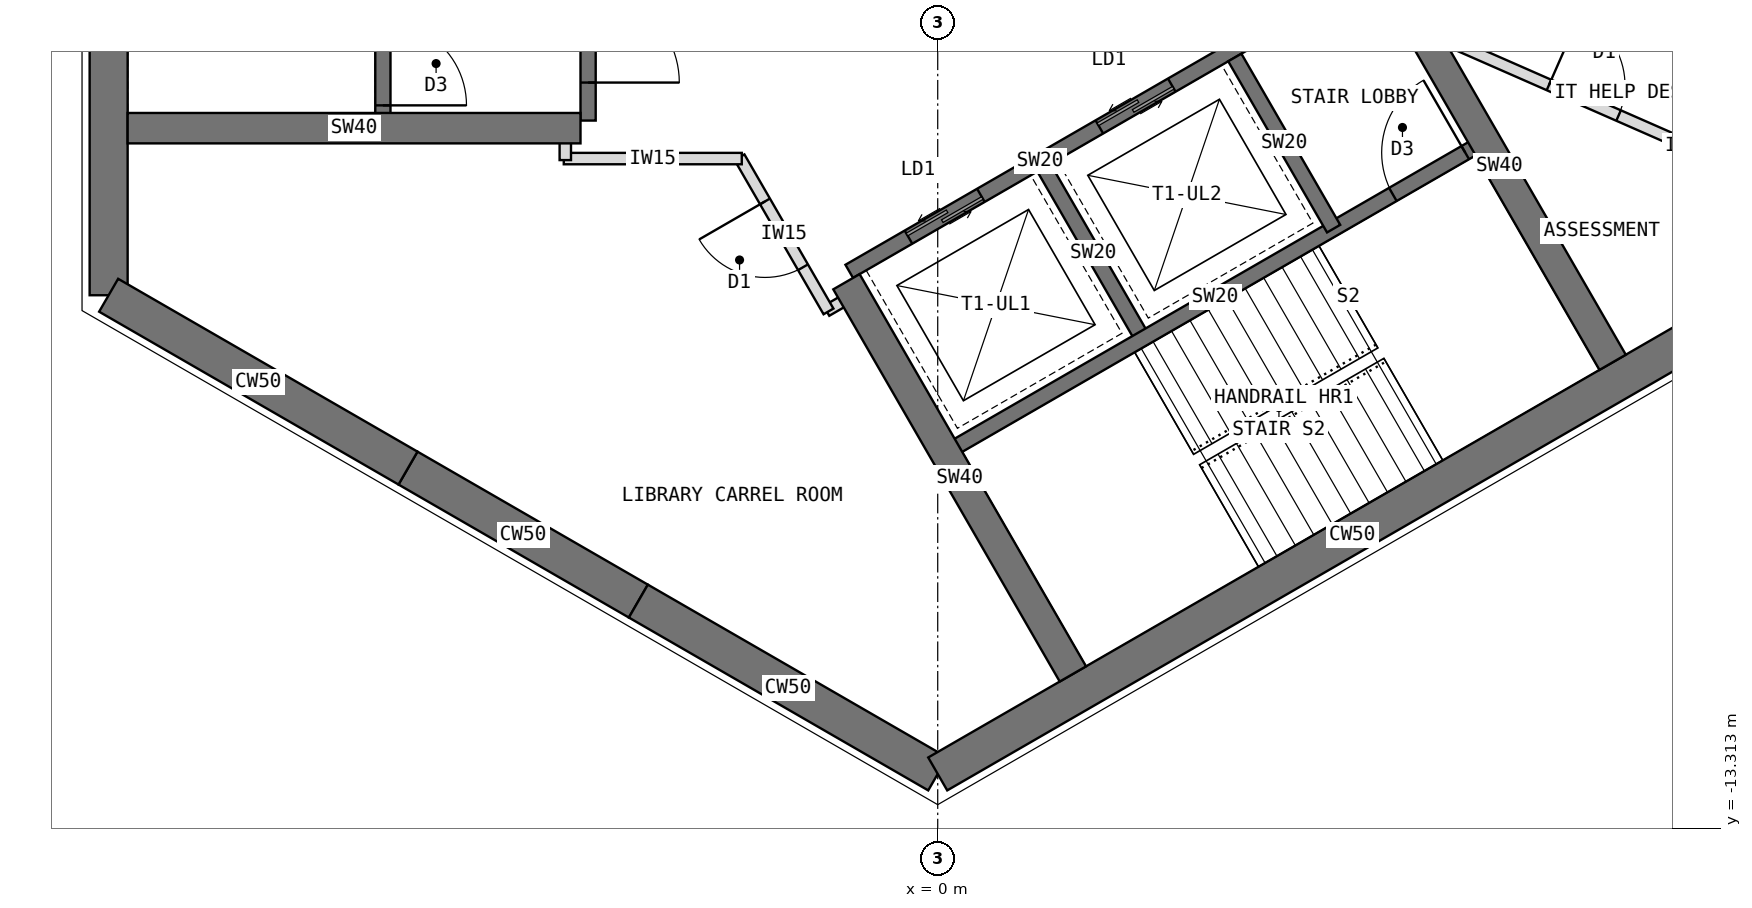
"""IFC4 building model, lengths in metres.
Left out: names, types, materials, properties, quantities, classifications, styles, units other than length and angle.
Written with IfcOpenShell. Run it as: python <this file> out.ifc"""

import sys

from ifc_helpers import new_model, si_unit, direction, frame, frame_2d, origin, place, context, subcontext, project, spatial, rectangle, extrude, element, fill, save


model = new_model("IFC4")
c1 = context("Model", 3, precision=1e-05, world=origin(), true_north=direction((0.0, 1.0)))
c2 = subcontext(c1, "Body", "Model", "MODEL_VIEW")
j1 = project(units=[si_unit("LENGTHUNIT", "METRE"), si_unit("PLANEANGLEUNIT", "RADIAN")], contexts=[c1])
p1 = place(None, origin())
s1 = spatial("IfcSite", under=j1, at=p1, CompositionType="ELEMENT")
p2 = place(p1, origin())
s2 = spatial("IfcBuilding", under=s1, at=p2, CompositionType="ELEMENT")
p3 = place(p2, frame((0.0, 0.0, 194.5)))
s3 = spatial("IfcBuildingStorey", under=s2, at=p3, CompositionType="ELEMENT", Elevation=194.5)
p4 = place(p3, frame((-10.908, 6.298, 0.0), z_axis=(0.0, 0.0, 1.0), x_axis=(0.0, -1.0, 0.0)))
e1 = element("IfcWall", 1, at=p4, inside=s3, PredefinedType="SHEAR", context=c2, shape_type="SweptSolid", body=[
    extrude(rectangle(XDim=12.596, YDim=0.5, at=frame_2d((6.298, 0.0))), origin(), (0.0, 0.0, 1.0), 4.0),
])
p5 = place(p3, frame((-10.908, -6.298, 0.0), z_axis=(0.0, 0.0, 1.0), x_axis=(0.866034513004, -0.499984222037, 0.0)))
e2 = element("IfcWall", 2, at=p5, inside=s3, PredefinedType="SHEAR", context=c2, shape_type="SweptSolid", body=[
    extrude(rectangle(XDim=4.548, YDim=0.5, at=frame_2d((2.274, 0.0))), origin(), (0.0, 0.0, 1.0), 4.0),
])
p6 = place(p3, frame((-6.97, -8.572, 0.0), z_axis=(0.0, 0.0, 1.0), x_axis=(0.866019471182, -0.500010275428, 0.0)))
e3 = element("IfcWall", 3, at=p6, inside=s3, PredefinedType="SHEAR", context=c2, shape_type="SweptSolid", body=[
    extrude(rectangle(XDim=3.5, YDim=0.5, at=frame_2d((1.75, 0.0))), origin(), (0.0, 0.0, 1.0), 4.0),
])
p7 = place(p3, frame((-3.939, -10.322, 0.0), z_axis=(0.0, 0.0, 1.0), x_axis=(0.866011268655, -0.500024481964, 0.0)))
e4 = element("IfcWall", 4, at=p7, inside=s3, PredefinedType="SHEAR", context=c2, shape_type="SweptSolid", body=[
    extrude(rectangle(XDim=4.548, YDim=0.5, at=frame_2d((2.274, 0.0))), origin(), (0.0, 0.0, 1.0), 4.0),
])
p8 = place(p3, frame((0.0, -12.596, 0.0), z_axis=(0.0, 0.0, 1.0), x_axis=(0.866021940709, 0.500005998175, 0.0)))
e5 = element("IfcWall", 5, at=p8, inside=s3, PredefinedType="SHEAR", context=c2, shape_type="SweptSolid", body=[
    extrude(rectangle(XDim=12.596, YDim=0.5, at=frame_2d((6.298, 0.0))), origin(), (0.0, 0.0, 1.0), 4.0),
])
p9 = place(p3, frame((-4.6, 4.0, 0.0), z_axis=(0.0, 0.0, 1.0), x_axis=(0.0, -1.0, 0.0)))
e6 = element("IfcWall", 6, at=p9, inside=s3, PredefinedType="SHEAR", context=c2, shape_type="SweptSolid", body=[
    extrude(rectangle(XDim=8.0, YDim=0.2, at=frame_2d((4.0, 0.0))), origin(), (0.0, 0.0, 1.0), 4.0),
])
p10 = place(p9, frame((6.3, 0.0, 0.0)))
e7 = element("IfcOpeningElement", 7, at=p10, cuts=e6, PredefinedType="OPENING", context=c2, shape_type="SweptSolid", body=[
    extrude(rectangle(XDim=1.2, YDim=2.1, at=frame_2d((0.6, 1.05))), frame((0.0, 0.11, 0.0), z_axis=(0.0, -1.0, 0.0), x_axis=(1.0, 0.0, 0.0)), (0.0, 0.0, 1.0), 0.22),
])
p11 = place(p9, frame((0.9, 0.0, 0.0)))
e8 = element("IfcOpeningElement", 8, at=p11, cuts=e6, PredefinedType="OPENING", context=c2, shape_type="SweptSolid", body=[
    extrude(rectangle(XDim=1.1, YDim=2.2, at=frame_2d((0.55, 1.1))), frame((0.0, 0.11, 0.0), z_axis=(0.0, -1.0, 0.0), x_axis=(1.0, 0.0, 0.0)), (0.0, 0.0, 1.0), 0.22),
])
p12 = place(p3, frame((-7.3, 4.0, 0.0), z_axis=(0.0, 0.0, 1.0), x_axis=(0.0, -1.0, 0.0)))
e9 = element("IfcWall", 9, at=p12, inside=s3, PredefinedType="SHEAR", context=c2, shape_type="SweptSolid", body=[
    extrude(rectangle(XDim=8.0, YDim=0.2, at=frame_2d((4.0, 0.0))), origin(), (0.0, 0.0, 1.0), 4.0),
])
p13 = place(p12, frame((6.7, 0.0, 0.0)))
e10 = element("IfcOpeningElement", 10, at=p13, cuts=e9, PredefinedType="OPENING", context=c2, shape_type="SweptSolid", body=[
    extrude(rectangle(XDim=1.1, YDim=2.1, at=frame_2d((0.55, 1.05))), frame((0.0, 0.11, 0.0), z_axis=(0.0, -1.0, 0.0), x_axis=(1.0, 0.0, 0.0)), (0.0, 0.0, 1.0), 0.22),
])
p14 = place(p3, frame((-4.7, -4.1, 0.0), z_axis=(0.0, 0.0, 1.0), x_axis=(-1.0, 0.0, 0.0)))
e11 = element("IfcWall", 11, at=p14, inside=s3, PredefinedType="SHEAR", context=c2, shape_type="SweptSolid", body=[
    extrude(rectangle(XDim=5.958, YDim=0.4, at=frame_2d((2.979, 0.0))), origin(), (0.0, 0.0, 1.0), 4.0),
])
p15 = place(p3, frame((-1.164, -5.984, 0.0), z_axis=(0.0, 0.0, 1.0), x_axis=(0.866026010844, 0.49999894854, 0.0)))
e12 = element("IfcWall", 12, at=p15, inside=s3, PredefinedType="SHEAR", context=c2, shape_type="SweptSolid", body=[
    extrude(rectangle(XDim=8.0, YDim=0.2, at=frame_2d((4.0, 0.0))), origin(), (0.0, 0.0, 1.0), 4.0),
])
p16 = place(p15, frame((6.3, 0.0, 0.0)))
e13 = element("IfcOpeningElement", 13, at=p16, cuts=e12, PredefinedType="OPENING", context=c2, shape_type="SweptSolid", body=[
    extrude(rectangle(XDim=1.2, YDim=2.1, at=frame_2d((0.6, 1.05))), frame((0.0, 0.11, 0.0), z_axis=(0.0, -1.0, 0.0), x_axis=(1.0, 0.0, 0.0)), (0.0, 0.0, 1.0), 0.22),
])
p17 = place(p15, frame((0.9, 0.0, 0.0)))
e14 = element("IfcOpeningElement", 14, at=p17, cuts=e12, PredefinedType="OPENING", context=c2, shape_type="SweptSolid", body=[
    extrude(rectangle(XDim=1.1, YDim=2.2, at=frame_2d((0.55, 1.1))), frame((0.0, 0.11, 0.0), z_axis=(0.0, -1.0, 0.0), x_axis=(1.0, 0.0, 0.0)), (0.0, 0.0, 1.0), 0.22),
])
p18 = place(p15, frame((3.8, 0.0, 0.0)))
e15 = element("IfcOpeningElement", 15, at=p18, cuts=e12, PredefinedType="OPENING", context=c2, shape_type="SweptSolid", body=[
    extrude(rectangle(XDim=1.1, YDim=2.2, at=frame_2d((0.55, 1.1))), frame((0.0, 0.11, 0.0), z_axis=(0.0, -1.0, 0.0), x_axis=(1.0, 0.0, 0.0)), (0.0, 0.0, 1.0), 0.22),
])
p19 = place(p3, frame((1.397, -4.62, 0.0), z_axis=(0.0, 0.0, 1.0), x_axis=(0.499936506574, -0.866062058628, 0.0)))
e16 = element("IfcWall", 16, at=p19, inside=s3, PredefinedType="SHEAR", context=c2, shape_type="SweptSolid", body=[
    extrude(rectangle(XDim=2.6, YDim=0.2, at=frame_2d((1.3, 0.0))), origin(), (0.0, 0.0, 1.0), 4.0),
])
p20 = place(p3, frame((3.909, -3.17, 0.0), z_axis=(0.0, 0.0, 1.0), x_axis=(0.49997716683, -0.86603858612, 0.0)))
e17 = element("IfcWall", 17, at=p20, inside=s3, PredefinedType="SHEAR", context=c2, shape_type="SweptSolid", body=[
    extrude(rectangle(XDim=2.6, YDim=0.2, at=frame_2d((1.3, 0.0))), origin(), (0.0, 0.0, 1.0), 4.0),
])
p21 = place(p3, frame((0.186, -8.322, 0.0), z_axis=(0.0, 0.0, 1.0), x_axis=(0.866026010844, 0.49999894854, 0.0)))
e18 = element("IfcWall", 18, at=p21, inside=s3, PredefinedType="SHEAR", context=c2, shape_type="SweptSolid", body=[
    extrude(rectangle(XDim=8.0, YDim=0.2, at=frame_2d((4.0, 0.0))), origin(), (0.0, 0.0, 1.0), 4.0),
])
p22 = place(p21, frame((6.7, 0.0, 0.0)))
e19 = element("IfcOpeningElement", 19, at=p22, cuts=e18, PredefinedType="OPENING", context=c2, shape_type="SweptSolid", body=[
    extrude(rectangle(XDim=1.1, YDim=2.1, at=frame_2d((0.55, 1.05))), frame((0.0, 0.11, 0.0), z_axis=(0.0, -1.0, 0.0), x_axis=(1.0, 0.0, 0.0)), (0.0, 0.0, 1.0), 0.22),
])
p23 = place(p3, frame((5.901, -2.02, 0.0), z_axis=(0.0, 0.0, 1.0), x_axis=(0.500003832394, -0.86602319114, 0.0)))
e20 = element("IfcWall", 20, at=p23, inside=s3, PredefinedType="SHEAR", context=c2, shape_type="SweptSolid", body=[
    extrude(rectangle(XDim=5.958, YDim=0.4, at=frame_2d((2.979, 0.0))), origin(), (0.0, 0.0, 1.0), 4.0),
])
p24 = place(p3, frame((-1.201, -6.12, 0.0), z_axis=(0.0, 0.0, 1.0), x_axis=(0.500021575205, -0.866012946976, 0.0)))
e21 = element("IfcWall", 21, at=p24, inside=s3, PredefinedType="SHEAR", context=c2, shape_type="SweptSolid", body=[
    extrude(rectangle(XDim=5.958, YDim=0.4, at=frame_2d((2.979, 0.0))), origin(), (0.0, 0.0, 1.0), 4.0),
])
p25 = place(p3, frame((-1.092, -6.289, 0.0), z_axis=(0.0, 0.0, 1.0), x_axis=(-0.866138304741, -0.499804398801, 0.0)))
e22 = element("IfcWall", 22, at=p25, inside=s3, PredefinedType="PARTITIONING", context=c2, shape_type="SweptSolid", body=[
    extrude(rectangle(XDim=0.43, YDim=0.15, at=frame_2d((0.215, 0.0))), origin(), (0.0, 0.0, 1.0), 3.8),
])
p26 = place(p3, frame((-1.437, -6.511, 0.0), z_axis=(0.0, 0.0, 1.0), x_axis=(-0.500074377092, 0.865982457891, 0.0)))
e23 = element("IfcWall", 23, at=p26, inside=s3, PredefinedType="PARTITIONING", context=c2, shape_type="SweptSolid", body=[
    extrude(rectangle(XDim=2.342, YDim=0.15, at=frame_2d((1.171, 0.0))), origin(), (0.0, 0.0, 1.0), 3.8),
])
p27 = place(p26, frame((0.671, 0.0, 0.0)))
e24 = element("IfcOpeningElement", 24, at=p27, cuts=e23, PredefinedType="OPENING", context=c2, shape_type="SweptSolid", body=[
    extrude(rectangle(XDim=1.0, YDim=2.1, at=frame_2d((0.5, 1.05))), frame((0.0, 0.085, 0.0), z_axis=(0.0, -1.0, 0.0), x_axis=(1.0, 0.0, 0.0)), (0.0, 0.0, 1.0), 0.17),
])
p28 = place(p3, frame((-2.578, -4.5, 0.0), z_axis=(0.0, 0.0, 1.0), x_axis=(-1.0, 0.0, 0.0)))
e25 = element("IfcWall", 25, at=p28, inside=s3, PredefinedType="PARTITIONING", context=c2, shape_type="SweptSolid", body=[
    extrude(rectangle(XDim=2.342, YDim=0.15, at=frame_2d((1.171, 0.0))), origin(), (0.0, 0.0, 1.0), 3.8),
])
p29 = place(p3, frame((-4.9, -4.52, 0.0), z_axis=(0.0, 0.0, 1.0), x_axis=(0.0, 1.0, 0.0)))
e26 = element("IfcWall", 26, at=p29, inside=s3, PredefinedType="PARTITIONING", context=c2, shape_type="SweptSolid", body=[
    extrude(rectangle(XDim=0.43, YDim=0.15, at=frame_2d((0.215, 0.0))), origin(), (0.0, 0.0, 1.0), 3.8),
])
p30 = place(p3, frame((6.342, -2.785, 0.0), z_axis=(0.0, 0.0, 1.0), x_axis=(0.915607292951, -0.402073730919, 0.0)))
e27 = element("IfcWall", 27, at=p30, inside=s3, PredefinedType="PARTITIONING", context=c2, shape_type="SweptSolid", body=[
    extrude(rectangle(XDim=4.714, YDim=0.15, at=frame_2d((2.357, 0.0))), origin(), (0.0, 0.0, 1.0), 3.8),
])
p31 = place(p30, frame((1.857, 0.0, 0.0)))
e28 = element("IfcOpeningElement", 28, at=p31, cuts=e27, PredefinedType="OPENING", context=c2, shape_type="SweptSolid", body=[
    extrude(rectangle(XDim=1.0, YDim=2.1, at=frame_2d((0.5, 1.05))), frame((0.0, 0.085, 0.0), z_axis=(0.0, -1.0, 0.0), x_axis=(1.0, 0.0, 0.0)), (0.0, 0.0, 1.0), 0.17),
])
p32 = place(p10, origin())
e29 = element("IfcDoor", 29, at=p32, inside=s3, OperationType="SINGLE_SWING_RIGHT", PredefinedType="DOOR", context=c2, shape_type="SweptSolid", body=[
    extrude(rectangle(XDim=1.2, YDim=2.1, at=frame_2d((0.6, 1.05))), frame((0.0, 0.025, 0.0), z_axis=(0.0, -1.0, 0.0), x_axis=(1.0, 0.0, 0.0)), (0.0, 0.0, 1.0), 0.05),
])
fill(e7, e29)
p33 = place(p13, origin())
e30 = element("IfcDoor", 30, at=p33, inside=s3, OperationType="SINGLE_SWING_RIGHT", PredefinedType="DOOR", context=c2, shape_type="SweptSolid", body=[
    extrude(rectangle(XDim=1.1, YDim=2.1, at=frame_2d((0.55, 1.05))), frame((0.0, 0.025, 0.0), z_axis=(0.0, -1.0, 0.0), x_axis=(1.0, 0.0, 0.0)), (0.0, 0.0, 1.0), 0.05),
])
fill(e10, e30)
p34 = place(p17, origin())
e31 = element("IfcDoor", 31, at=p34, inside=s3, OperationType="DOUBLE_DOOR_SLIDING", PredefinedType="DOOR", context=c2, shape_type="SweptSolid", body=[
    extrude(rectangle(XDim=1.1, YDim=2.2, at=frame_2d((0.55, 1.1))), frame((0.0, 0.025, 0.0), z_axis=(0.0, -1.0, 0.0), x_axis=(1.0, 0.0, 0.0)), (0.0, 0.0, 1.0), 0.05),
])
fill(e14, e31)
p35 = place(p18, origin())
e32 = element("IfcDoor", 32, at=p35, inside=s3, OperationType="DOUBLE_DOOR_SLIDING", PredefinedType="DOOR", context=c2, shape_type="SweptSolid", body=[
    extrude(rectangle(XDim=1.1, YDim=2.2, at=frame_2d((0.55, 1.1))), frame((0.0, 0.025, 0.0), z_axis=(0.0, -1.0, 0.0), x_axis=(1.0, 0.0, 0.0)), (0.0, 0.0, 1.0), 0.05),
])
fill(e15, e32)
p36 = place(p22, origin())
e33 = element("IfcDoor", 33, at=p36, inside=s3, OperationType="SINGLE_SWING_RIGHT", PredefinedType="DOOR", context=c2, shape_type="SweptSolid", body=[
    extrude(rectangle(XDim=1.1, YDim=2.1, at=frame_2d((0.55, 1.05))), frame((0.0, 0.025, 0.0), z_axis=(0.0, -1.0, 0.0), x_axis=(1.0, 0.0, 0.0)), (0.0, 0.0, 1.0), 0.05),
])
fill(e19, e33)
p37 = place(p27, origin())
e34 = element("IfcDoor", 34, at=p37, inside=s3, OperationType="SINGLE_SWING_RIGHT", PredefinedType="DOOR", context=c2, shape_type="SweptSolid", body=[
    extrude(rectangle(XDim=1.0, YDim=2.1, at=frame_2d((0.5, 1.05))), frame((0.0, 0.025, 0.0), z_axis=(0.0, -1.0, 0.0), x_axis=(1.0, 0.0, 0.0)), (0.0, 0.0, 1.0), 0.05),
])
fill(e24, e34)
p38 = place(p31, origin())
e35 = element("IfcDoor", 35, at=p38, inside=s3, OperationType="SINGLE_SWING_LEFT", PredefinedType="DOOR", context=c2, shape_type="SweptSolid", body=[
    extrude(rectangle(XDim=1.0, YDim=2.1, at=frame_2d((0.5, 1.05))), frame((0.0, 0.025, 0.0), z_axis=(0.0, -1.0, 0.0), x_axis=(1.0, 0.0, 0.0)), (0.0, 0.0, 1.0), 0.05),
])
fill(e28, e35)
save(model, sys.argv[1])
